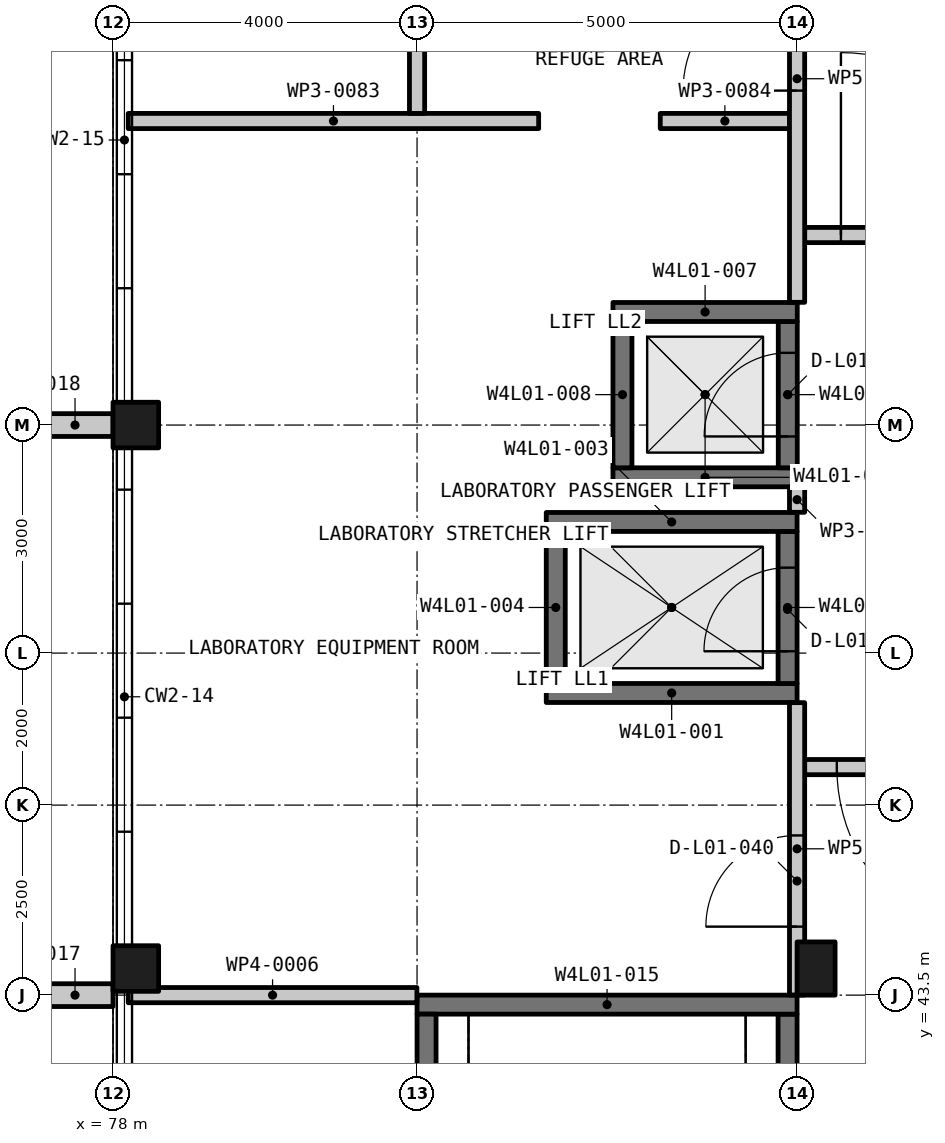
"""IFC4 building model, lengths in metres.
Left out: names, types, materials, properties, quantities, classifications, styles, units other than length and angle.
Written with IfcOpenShell. Run it as: python <this file> out.ifc"""

import sys

from ifc_helpers import new_model, si_unit, direction, frame, frame_2d, origin, origin_2d, place, context, subcontext, project, spatial, rectangle, extrude, element, fill, save


model = new_model("IFC4")
c1 = context("Model", 3, precision=1e-05, world=origin(), true_north=direction((0.0, 1.0)))
c2 = subcontext(c1, "Body", "Model", "MODEL_VIEW")
j1 = project(units=[si_unit("LENGTHUNIT", "METRE"), si_unit("PLANEANGLEUNIT", "RADIAN")], contexts=[c1])
p1 = place(None, origin())
s1 = spatial("IfcSite", under=j1, at=p1, CompositionType="ELEMENT")
p2 = place(p1, origin())
s2 = spatial("IfcBuilding", under=s1, at=p2, CompositionType="ELEMENT")
p3 = place(p2, frame((0.0, 0.0, 6.0)))
s3 = spatial("IfcBuildingStorey", under=s2, at=p3, CompositionType="ELEMENT", Elevation=6.0)
for number, where, z_axis, x_axis in (
    (1, (78.3, 43.85, -0.3), (0.0, 0.0, 1.0), (1.0, 0.0, 0.0)),
    (2, (78.3, 51.0, -0.3), (0.0, 0.0, 1.0), (1.0, 0.0, 0.0)),
):
    element("IfcColumn", number, at=place(p3, frame(where, z_axis=z_axis, x_axis=x_axis)), inside=s3, PredefinedType="COLUMN", context=c2, shape_type="SweptSolid", body=[
        extrude(rectangle(XDim=0.6, YDim=0.6, at=origin_2d()), origin(), (0.0, 0.0, 1.0), 5.25),
    ])
p4 = place(p3, frame((87.25, 43.85, -0.3), z_axis=(0.0, 0.0, 1.0), x_axis=(1.0, 0.0, 0.0)))
e3 = element("IfcColumn", 3, at=p4, inside=s3, PredefinedType="COLUMN", context=c2, shape_type="SweptSolid", body=[
    extrude(rectangle(XDim=0.5, YDim=0.7, at=origin_2d()), origin(), (0.0, 0.0, 1.0), 5.25),
])
p5 = place(p3, frame((83.7, 47.475, -0.3), z_axis=(0.0, 0.0, 1.0), x_axis=(1.0, 0.0, 0.0)))
e4 = element("IfcWall", 4, at=p5, inside=s3, PredefinedType="SHEAR", context=c2, shape_type="SweptSolid", body=[
    extrude(rectangle(XDim=3.3, YDim=0.25, at=frame_2d((1.65, 0.0))), origin(), (0.0, 0.0, 1.0), 5.25),
])
p6 = place(p3, frame((86.875, 47.6, -0.3), z_axis=(0.0, 0.0, 1.0), x_axis=(0.0, 1.0, 0.0)))
e5 = element("IfcWall", 5, at=p6, inside=s3, PredefinedType="SHEAR", context=c2, shape_type="SweptSolid", body=[
    extrude(rectangle(XDim=2.0, YDim=0.25, at=frame_2d((1.0, 0.0))), origin(), (0.0, 0.0, 1.0), 5.25),
])
p7 = place(p6, frame((0.424, 0.0, 0.3)))
e6 = element("IfcOpeningElement", 6, at=p7, cuts=e5, PredefinedType="OPENING", context=c2, shape_type="SweptSolid", body=[
    extrude(rectangle(XDim=1.1, YDim=2.1, at=frame_2d((0.55, 1.05))), frame((0.0, 0.135, 0.0), z_axis=(0.0, -1.0, 0.0), x_axis=(1.0, 0.0, 0.0)), (0.0, 0.0, 1.0), 0.27),
])
p8 = place(p3, frame((83.7, 49.725, -0.3), z_axis=(0.0, 0.0, 1.0), x_axis=(1.0, 0.0, 0.0)))
e7 = element("IfcWall", 7, at=p8, inside=s3, PredefinedType="SHEAR", context=c2, shape_type="SweptSolid", body=[
    extrude(rectangle(XDim=3.3, YDim=0.25, at=frame_2d((1.65, 0.0))), origin(), (0.0, 0.0, 1.0), 5.25),
])
p9 = place(p3, frame((83.825, 47.6, -0.3), z_axis=(0.0, 0.0, 1.0), x_axis=(0.0, 1.0, 0.0)))
e8 = element("IfcWall", 8, at=p9, inside=s3, PredefinedType="SHEAR", context=c2, shape_type="SweptSolid", body=[
    extrude(rectangle(XDim=2.0, YDim=0.25, at=frame_2d((1.0, 0.0))), origin(), (0.0, 0.0, 1.0), 5.25),
])
p10 = place(p3, frame((84.577, 50.312, -0.3), z_axis=(0.0, 0.0, 1.0), x_axis=(1.0, 0.0, 0.0)))
e9 = element("IfcWall", 9, at=p10, inside=s3, PredefinedType="SHEAR", context=c2, shape_type="SweptSolid", body=[
    extrude(rectangle(XDim=2.425, YDim=0.25, at=frame_2d((1.212, 0.0))), origin(), (0.0, 0.0, 1.0), 5.25),
])
p11 = place(p3, frame((86.877, 50.438, -0.3), z_axis=(0.0, 0.0, 1.0), x_axis=(0.0, 1.0, 0.0)))
e10 = element("IfcWall", 10, at=p11, inside=s3, PredefinedType="SHEAR", context=c2, shape_type="SweptSolid", body=[
    extrude(rectangle(XDim=1.925, YDim=0.25, at=frame_2d((0.962, 0.0))), origin(), (0.0, 0.0, 1.0), 5.25),
])
p12 = place(p11, frame((0.413, 0.0, 0.3)))
e11 = element("IfcOpeningElement", 11, at=p12, cuts=e10, PredefinedType="OPENING", context=c2, shape_type="SweptSolid", body=[
    extrude(rectangle(XDim=1.1, YDim=2.1, at=frame_2d((0.55, 1.05))), frame((0.0, 0.135, 0.0), z_axis=(0.0, -1.0, 0.0), x_axis=(1.0, 0.0, 0.0)), (0.0, 0.0, 1.0), 0.27),
])
p13 = place(p3, frame((84.577, 52.488, -0.3), z_axis=(0.0, 0.0, 1.0), x_axis=(1.0, 0.0, 0.0)))
e12 = element("IfcWall", 12, at=p13, inside=s3, PredefinedType="SHEAR", context=c2, shape_type="SweptSolid", body=[
    extrude(rectangle(XDim=2.425, YDim=0.25, at=frame_2d((1.212, 0.0))), origin(), (0.0, 0.0, 1.0), 5.25),
])
p14 = place(p3, frame((84.702, 50.438, -0.3), z_axis=(0.0, 0.0, 1.0), x_axis=(0.0, 1.0, 0.0)))
e13 = element("IfcWall", 13, at=p14, inside=s3, PredefinedType="SHEAR", context=c2, shape_type="SweptSolid", body=[
    extrude(rectangle(XDim=1.925, YDim=0.25, at=frame_2d((0.962, 0.0))), origin(), (0.0, 0.0, 1.0), 5.25),
])
p15 = place(p3, frame((86.875, 36.25, -0.3), z_axis=(0.0, 0.0, 1.0), x_axis=(0.0, 1.0, 0.0)))
e14 = element("IfcWall", 14, at=p15, inside=s3, PredefinedType="SHEAR", context=c2, shape_type="SweptSolid", body=[
    extrude(rectangle(XDim=7.0, YDim=0.25, at=frame_2d((3.5, 0.0))), origin(), (0.0, 0.0, 1.0), 5.25),
])
p16 = place(p3, frame((82.0, 43.375, -0.3), z_axis=(0.0, 0.0, 1.0), x_axis=(1.0, 0.0, 0.0)))
e15 = element("IfcWall", 15, at=p16, inside=s3, PredefinedType="SHEAR", context=c2, shape_type="SweptSolid", body=[
    extrude(rectangle(XDim=5.0, YDim=0.25, at=frame_2d((2.5, 0.0))), origin(), (0.0, 0.0, 1.0), 5.25),
])
p17 = place(p3, frame((82.125, 36.25, -0.3), z_axis=(0.0, 0.0, 1.0), x_axis=(0.0, 1.0, 0.0)))
e16 = element("IfcWall", 16, at=p17, inside=s3, PredefinedType="SHEAR", context=c2, shape_type="SweptSolid", body=[
    extrude(rectangle(XDim=7.0, YDim=0.25, at=frame_2d((3.5, 0.0))), origin(), (0.0, 0.0, 1.0), 5.25),
])
for number, where, z_axis, x_axis in (
    (17, (77.0, 43.5, 0.0), (0.0, 0.0, 1.0), (1.0, 0.0, 0.0)),
    (18, (77.0, 51.0, 0.0), (0.0, 0.0, 1.0), (1.0, 0.0, 0.0)),
):
    element("IfcWall", number, at=place(p3, frame(where, z_axis=z_axis, x_axis=x_axis)), inside=s3, PredefinedType="SOLIDWALL", context=c2, shape_type="SweptSolid", body=[
        extrude(rectangle(XDim=1.0, YDim=0.3, at=frame_2d((0.5, 0.0))), origin(), (0.0, 0.0, 1.0), 5.25),
    ])
p18 = place(p3, frame((78.2, 43.5, 0.0), z_axis=(0.0, 0.0, 1.0), x_axis=(1.0, 0.0, 0.0)))
e19 = element("IfcWall", 19, at=p18, inside=s3, PredefinedType="PARTITIONING", context=c2, shape_type="SweptSolid", body=[
    extrude(rectangle(XDim=3.798, YDim=0.2, at=frame_2d((1.899, 0.0))), origin(), (0.0, 0.0, 1.0), 4.15),
])
p19 = place(p3, frame((90.4, 46.5, 0.0), z_axis=(0.0, 0.0, 1.0), x_axis=(-1.0, 0.0, 0.0)))
e20 = element("IfcWall", 20, at=p19, inside=s3, PredefinedType="PARTITIONING", context=c2, shape_type="SweptSolid", body=[
    extrude(rectangle(XDim=3.3, YDim=0.2, at=frame_2d((1.65, 0.0))), origin(), (0.0, 0.0, 1.0), 4.15),
])
p20 = place(p19, frame((0.477, 0.0, 0.0)))
e21 = element("IfcOpeningElement", 21, at=p20, cuts=e20, PredefinedType="OPENING", context=c2, shape_type="SweptSolid", body=[
    extrude(rectangle(XDim=2.4, YDim=2.1, at=frame_2d((1.2, 1.05))), frame((0.0, 0.11, 0.0), z_axis=(0.0, -1.0, 0.0), x_axis=(1.0, 0.0, 0.0)), (0.0, 0.0, 1.0), 0.22),
])
p21 = place(p3, frame((87.1, 53.5, 0.0), z_axis=(0.0, 0.0, 1.0), x_axis=(1.0, 0.0, 0.0)))
e22 = element("IfcWall", 22, at=p21, inside=s3, PredefinedType="PARTITIONING", context=c2, shape_type="SweptSolid", body=[
    extrude(rectangle(XDim=3.3, YDim=0.2, at=frame_2d((1.65, 0.0))), origin(), (0.0, 0.0, 1.0), 4.15),
])
p22 = place(p21, frame((0.477, 0.0, 0.0)))
e23 = element("IfcOpeningElement", 23, at=p22, cuts=e22, PredefinedType="OPENING", context=c2, shape_type="SweptSolid", body=[
    extrude(rectangle(XDim=2.4, YDim=2.1, at=frame_2d((1.2, 1.05))), frame((0.0, 0.11, 0.0), z_axis=(0.0, -1.0, 0.0), x_axis=(1.0, 0.0, 0.0)), (0.0, 0.0, 1.0), 0.22),
])
p23 = place(p3, frame((78.2, 55.0, 0.0), z_axis=(0.0, 0.0, 1.0), x_axis=(1.0, 0.0, 0.0)))
e24 = element("IfcWall", 24, at=p23, inside=s3, PredefinedType="PARTITIONING", context=c2, shape_type="SweptSolid", body=[
    extrude(rectangle(XDim=5.4, YDim=0.2, at=frame_2d((2.7, 0.0))), origin(), (0.0, 0.0, 1.0), 4.15),
])
p24 = place(p3, frame((85.2, 55.0, 0.0), z_axis=(0.0, 0.0, 1.0), x_axis=(1.0, 0.0, 0.0)))
e25 = element("IfcWall", 25, at=p24, inside=s3, PredefinedType="PARTITIONING", context=c2, shape_type="SweptSolid", body=[
    extrude(rectangle(XDim=1.7, YDim=0.2, at=frame_2d((0.85, 0.0))), origin(), (0.0, 0.0, 1.0), 4.35),
])
p25 = place(p3, frame((87.0, 43.502, 0.0), z_axis=(0.0, 0.0, 1.0), x_axis=(0.0, 1.0, 0.0)))
e26 = element("IfcWall", 26, at=p25, inside=s3, PredefinedType="PARTITIONING", context=c2, shape_type="SweptSolid", body=[
    extrude(rectangle(XDim=3.846, YDim=0.2, at=frame_2d((1.923, 0.0))), origin(), (0.0, 0.0, 1.0), 4.15),
])
p26 = place(p25, frame((0.899, 0.0, 0.0)))
e27 = element("IfcOpeningElement", 27, at=p26, cuts=e26, PredefinedType="OPENING", context=c2, shape_type="SweptSolid", body=[
    extrude(rectangle(XDim=1.2, YDim=2.1, at=frame_2d((0.6, 1.05))), frame((0.0, 0.11, 0.0), z_axis=(0.0, -1.0, 0.0), x_axis=(1.0, 0.0, 0.0)), (0.0, 0.0, 1.0), 0.22),
])
p27 = place(p3, frame((87.0, 49.852, 0.0), z_axis=(0.0, 0.0, 1.0), x_axis=(0.0, 1.0, 0.0)))
e28 = element("IfcWall", 28, at=p27, inside=s3, PredefinedType="PARTITIONING", context=c2, shape_type="SweptSolid", body=[
    extrude(rectangle(XDim=0.333, YDim=0.2, at=frame_2d((0.167, 0.0))), origin(), (0.0, 0.0, 1.0), 4.15),
])
p28 = place(p3, frame((87.0, 52.615, 0.0), z_axis=(0.0, 0.0, 1.0), x_axis=(0.0, 1.0, 0.0)))
e29 = element("IfcWall", 29, at=p28, inside=s3, PredefinedType="PARTITIONING", context=c2, shape_type="SweptSolid", body=[
    extrude(rectangle(XDim=5.884, YDim=0.2, at=frame_2d((2.942, 0.0))), origin(), (0.0, 0.0, 1.0), 4.15),
])
p29 = place(p28, frame((2.785, 0.0, 0.0)))
e30 = element("IfcOpeningElement", 30, at=p29, cuts=e29, PredefinedType="OPENING", context=c2, shape_type="SweptSolid", body=[
    extrude(rectangle(XDim=1.5, YDim=2.1, at=frame_2d((0.75, 1.05))), frame((0.0, 0.11, 0.0), z_axis=(0.0, -1.0, 0.0), x_axis=(1.0, 0.0, 0.0)), (0.0, 0.0, 1.0), 0.22),
])
p30 = place(p3, frame((82.0, 55.1, 0.0), z_axis=(0.0, 0.0, 1.0), x_axis=(0.0, 1.0, 0.0)))
e31 = element("IfcWall", 31, at=p30, inside=s3, PredefinedType="PARTITIONING", context=c2, shape_type="SweptSolid", body=[
    extrude(rectangle(XDim=3.398, YDim=0.2, at=frame_2d((1.699, 0.0))), origin(), (0.0, 0.0, 1.0), 4.15),
])
p31 = place(p30, frame((1.051, 0.0, 0.0)))
e32 = element("IfcOpeningElement", 32, at=p31, cuts=e31, PredefinedType="OPENING", context=c2, shape_type="SweptSolid", body=[
    extrude(rectangle(XDim=1.2, YDim=2.1, at=frame_2d((0.6, 1.05))), frame((0.0, 0.11, 0.0), z_axis=(0.0, -1.0, 0.0), x_axis=(1.0, 0.0, 0.0)), (0.0, 0.0, 1.0), 0.22),
])
p32 = place(p22, origin())
e33 = element("IfcDoor", 33, at=p32, inside=s3, OperationType="DOUBLE_DOOR_SINGLE_SWING", PredefinedType="DOOR", context=c2, shape_type="SweptSolid", body=[
    extrude(rectangle(XDim=2.4, YDim=2.1, at=frame_2d((1.2, 1.05))), frame((0.0, 0.025, 0.0), z_axis=(0.0, -1.0, 0.0), x_axis=(1.0, 0.0, 0.0)), (0.0, 0.0, 1.0), 0.05),
])
fill(e23, e33)
p33 = place(p7, origin())
e34 = element("IfcDoor", 34, at=p33, inside=s3, OperationType="DOUBLE_DOOR_SLIDING", PredefinedType="DOOR", context=c2, shape_type="SweptSolid", body=[
    extrude(rectangle(XDim=1.1, YDim=2.1, at=frame_2d((0.55, 1.05))), frame((0.0, 0.025, 0.0), z_axis=(0.0, -1.0, 0.0), x_axis=(1.0, 0.0, 0.0)), (0.0, 0.0, 1.0), 0.05),
])
fill(e6, e34)
p34 = place(p12, origin())
e35 = element("IfcDoor", 35, at=p34, inside=s3, OperationType="DOUBLE_DOOR_SLIDING", PredefinedType="DOOR", context=c2, shape_type="SweptSolid", body=[
    extrude(rectangle(XDim=1.1, YDim=2.1, at=frame_2d((0.55, 1.05))), frame((0.0, 0.025, 0.0), z_axis=(0.0, -1.0, 0.0), x_axis=(1.0, 0.0, 0.0)), (0.0, 0.0, 1.0), 0.05),
])
fill(e11, e35)
p35 = place(p20, origin())
e36 = element("IfcDoor", 36, at=p35, inside=s3, OperationType="DOUBLE_DOOR_SINGLE_SWING", PredefinedType="DOOR", context=c2, shape_type="SweptSolid", body=[
    extrude(rectangle(XDim=2.4, YDim=2.1, at=frame_2d((1.2, 1.05))), frame((0.0, 0.025, 0.0), z_axis=(0.0, -1.0, 0.0), x_axis=(1.0, 0.0, 0.0)), (0.0, 0.0, 1.0), 0.05),
])
fill(e21, e36)
p36 = place(p29, origin())
e37 = element("IfcDoor", 37, at=p36, inside=s3, OperationType="DOUBLE_DOOR_SINGLE_SWING", PredefinedType="DOOR", context=c2, shape_type="SweptSolid", body=[
    extrude(rectangle(XDim=1.5, YDim=2.1, at=frame_2d((0.75, 1.05))), frame((0.0, 0.025, 0.0), z_axis=(0.0, -1.0, 0.0), x_axis=(1.0, 0.0, 0.0)), (0.0, 0.0, 1.0), 0.05),
])
fill(e30, e37)
p37 = place(p26, origin())
e38 = element("IfcDoor", 38, at=p37, inside=s3, OperationType="SINGLE_SWING_RIGHT", PredefinedType="DOOR", context=c2, shape_type="SweptSolid", body=[
    extrude(rectangle(XDim=1.2, YDim=2.1, at=frame_2d((0.6, 1.05))), frame((0.0, 0.025, 0.0), z_axis=(0.0, -1.0, 0.0), x_axis=(1.0, 0.0, 0.0)), (0.0, 0.0, 1.0), 0.05),
])
fill(e27, e38)
save(model, sys.argv[1])
